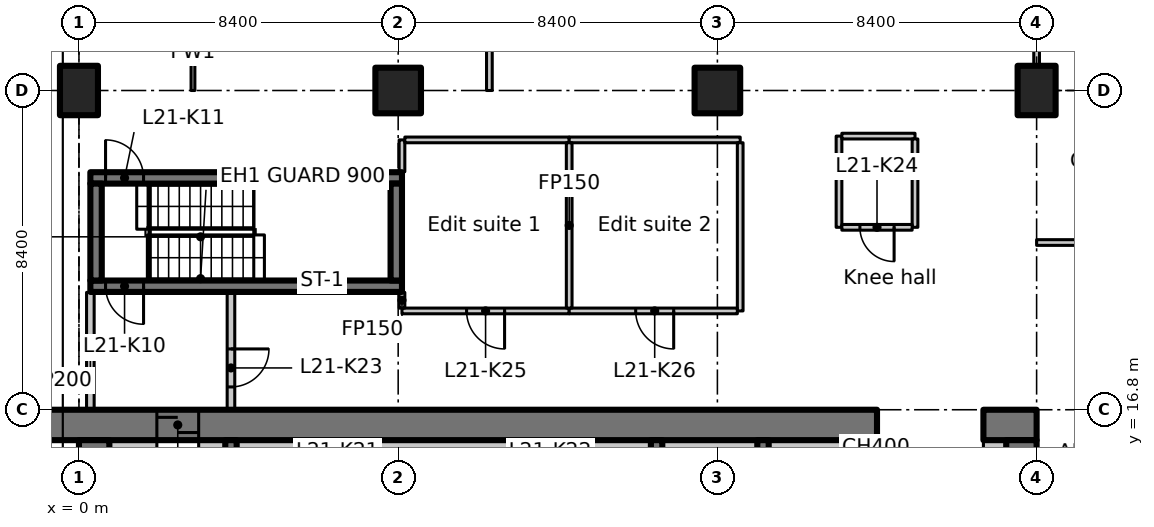
"""IFC4 building model, lengths in metres.
Left out: names, types, materials, properties, quantities, classifications, styles, units other than length and angle.
Written with IfcOpenShell. Run it as: python <this file> out.ifc"""

import sys

from ifc_helpers import new_model, si_unit, direction, frame, frame_2d, origin, origin_2d, place, context, subcontext, project, spatial, polyline, rectangle, outline, extrude, element, fill, save


model = new_model("IFC4")
c1 = context("Model", 3, precision=1e-05, world=origin(), true_north=direction((0.0, 1.0)))
c2 = subcontext(c1, "Body", "Model", "MODEL_VIEW")
j1 = project(units=[si_unit("LENGTHUNIT", "METRE"), si_unit("PLANEANGLEUNIT", "RADIAN")], contexts=[c1])
p1 = place(None, origin())
s1 = spatial("IfcSite", under=j1, at=p1, CompositionType="ELEMENT")
p2 = place(p1, origin())
s2 = spatial("IfcBuilding", under=s1, at=p2, CompositionType="ELEMENT")
p3 = place(p2, frame((0.0, 0.0, 91.7)))
s3 = spatial("IfcBuildingStorey", under=s2, at=p3, CompositionType="ELEMENT", Elevation=91.7)
p4 = place(p3, frame((0.0, 25.2, 0.0), z_axis=(0.0, 0.0, 1.0), x_axis=(1.0, 0.0, 0.0)))
e1 = element("IfcColumn", 1, at=p4, inside=s3, PredefinedType="COLUMN", context=c2, shape_type="SweptSolid", body=[
    extrude(rectangle(XDim=1.0, YDim=1.3, at=origin_2d()), origin(), (0.0, 0.0, 1.0), 3.35),
])
for number, where, z_axis, x_axis in (
    (2, (8.4, 25.2, 0.0), (0.0, 0.0, 1.0), (1.0, 0.0, 0.0)),
    (3, (16.8, 25.2, 0.0), (0.0, 0.0, 1.0), (1.0, 0.0, 0.0)),
):
    element("IfcColumn", number, at=place(p3, frame(where, z_axis=z_axis, x_axis=x_axis)), inside=s3, PredefinedType="COLUMN", context=c2, shape_type="SweptSolid", body=[
        extrude(rectangle(XDim=1.2, YDim=1.2, at=origin_2d()), origin(), (0.0, 0.0, 1.0), 3.35),
    ])
p5 = place(p3, frame((25.2, 25.2, 0.0), z_axis=(0.0, 0.0, 1.0), x_axis=(1.0, 0.0, 0.0)))
e4 = element("IfcColumn", 4, at=p5, inside=s3, PredefinedType="COLUMN", context=c2, shape_type="SweptSolid", body=[
    extrude(rectangle(XDim=1.0, YDim=1.3, at=origin_2d()), origin(), (0.0, 0.0, 1.0), 3.35),
])
p6 = place(p3, frame((-1.1, 16.4, 0.0), z_axis=(0.0, 0.0, 1.0), x_axis=(1.0, 0.0, 0.0)))
e5 = element("IfcWall", 5, at=p6, inside=s3, PredefinedType="SHEAR", context=c2, shape_type="SweptSolid", body=[
    extrude(rectangle(XDim=22.1, YDim=0.8, at=frame_2d((11.05, 0.0))), origin(), (0.0, 0.0, 1.0), 3.35),
])
p7 = place(p6, frame((3.15, 0.0, 0.0)))
e6 = element("IfcOpeningElement", 6, at=p7, cuts=e5, PredefinedType="OPENING", context=c2, shape_type="SweptSolid", body=[
    extrude(rectangle(XDim=1.1, YDim=2.3, at=frame_2d((0.55, 1.15))), frame((0.0, 0.41, 0.0), z_axis=(0.0, -1.0, 0.0), x_axis=(1.0, 0.0, 0.0)), (0.0, 0.0, 1.0), 0.82),
])
p8 = place(p3, frame((23.8, 16.4, 0.0), z_axis=(0.0, 0.0, 1.0), x_axis=(1.0, 0.0, 0.0)))
e7 = element("IfcWall", 7, at=p8, inside=s3, PredefinedType="SHEAR", context=c2, shape_type="SweptSolid", body=[
    extrude(rectangle(XDim=1.4, YDim=0.8, at=frame_2d((0.7, 0.0))), origin(), (0.0, 0.0, 1.0), 3.35),
])
p9 = place(p3, frame((0.4, 7.136, 0.0), z_axis=(0.0, 0.0, 1.0), x_axis=(0.0, 1.0, 0.0)))
e8 = element("IfcWall", 8, at=p9, inside=s3, PredefinedType="SHEAR", context=c2, shape_type="SweptSolid", body=[
    extrude(rectangle(XDim=8.864, YDim=0.8, at=frame_2d((4.432, 0.0))), origin(), (0.0, 0.0, 1.0), 3.35),
])
p10 = place(p3, frame((24.8, 12.6, 0.0), z_axis=(0.0, 0.0, 1.0), x_axis=(0.0, 1.0, 0.0)))
e9 = element("IfcWall", 9, at=p10, inside=s3, PredefinedType="SHEAR", context=c2, shape_type="SweptSolid", body=[
    extrude(rectangle(XDim=3.4, YDim=0.8, at=frame_2d((1.7, 0.0))), origin(), (0.0, 0.0, 1.0), 3.35),
])
p11 = place(p3, frame((0.8, 15.8, 0.0), z_axis=(0.0, 0.0, 1.0), x_axis=(1.0, 0.0, 0.0)))
e10 = element("IfcWall", 10, at=p11, inside=s3, PredefinedType="PARTITIONING", context=c2, shape_type="SweptSolid", body=[
    extrude(rectangle(XDim=1.25, YDim=0.4, at=frame_2d((0.625, 0.0))), origin(), (0.0, 0.0, 1.0), 3.35),
])
p12 = place(p3, frame((23.8, 15.8, 0.0), z_axis=(0.0, 0.0, 1.0), x_axis=(1.0, 0.0, 0.0)))
e11 = element("IfcWall", 11, at=p12, inside=s3, PredefinedType="PARTITIONING", context=c2, shape_type="SweptSolid", body=[
    extrude(rectangle(XDim=0.6, YDim=0.4, at=frame_2d((0.3, 0.0))), origin(), (0.0, 0.0, 1.0), 3.35),
])
for number, where, z_axis, x_axis in (
    (12, (4.0, 12.95, 0.0), (0.0, 0.0, 1.0), (0.0, 1.0, 0.0)),
    (13, (15.2, 12.95, 0.0), (0.0, 0.0, 1.0), (0.0, 1.0, 0.0)),
    (14, (18.0, 12.95, 0.0), (0.0, 0.0, 1.0), (0.0, 1.0, 0.0)),
    (15, (20.8, 12.95, 0.0), (0.0, 0.0, 1.0), (0.0, 1.0, 0.0)),
):
    element("IfcWall", number, at=place(p3, frame(where, z_axis=z_axis, x_axis=x_axis)), inside=s3, PredefinedType="SHEAR", context=c2, shape_type="SweptSolid", body=[
        extrude(rectangle(XDim=3.05, YDim=0.3, at=frame_2d((1.525, 0.0))), origin(), (0.0, 0.0, 1.0), 3.35),
    ])
p13 = place(p3, frame((8.5, 20.05, 0.0), z_axis=(0.0, 0.0, 1.0), x_axis=(-1.0, 0.0, 0.0)))
e16 = element("IfcWall", 16, at=p13, inside=s3, PredefinedType="SHEAR", context=c2, shape_type="SweptSolid", body=[
    extrude(rectangle(XDim=8.2, YDim=0.3, at=frame_2d((4.1, 0.0))), origin(), (0.0, 0.0, 1.0), 3.35),
])
p14 = place(p13, frame((6.8, 0.0, 0.0)))
e17 = element("IfcOpeningElement", 17, at=p14, cuts=e16, PredefinedType="OPENING", context=c2, shape_type="SweptSolid", body=[
    extrude(rectangle(XDim=1.0, YDim=2.1, at=frame_2d((0.5, 1.05))), frame((0.0, 0.16, 0.0), z_axis=(0.0, -1.0, 0.0), x_axis=(1.0, 0.0, 0.0)), (0.0, 0.0, 1.0), 0.32),
])
p15 = place(p3, frame((0.3, 22.9, 0.0), z_axis=(0.0, 0.0, 1.0), x_axis=(1.0, 0.0, 0.0)))
e18 = element("IfcWall", 18, at=p15, inside=s3, PredefinedType="SHEAR", context=c2, shape_type="SweptSolid", body=[
    extrude(rectangle(XDim=8.2, YDim=0.3, at=frame_2d((4.1, 0.0))), origin(), (0.0, 0.0, 1.0), 3.35),
])
p16 = place(p15, frame((0.4, 0.0, 0.0)))
e19 = element("IfcOpeningElement", 19, at=p16, cuts=e18, PredefinedType="OPENING", context=c2, shape_type="SweptSolid", body=[
    extrude(rectangle(XDim=1.0, YDim=2.1, at=frame_2d((0.5, 1.05))), frame((0.0, 0.16, 0.0), z_axis=(0.0, -1.0, 0.0), x_axis=(1.0, 0.0, 0.0)), (0.0, 0.0, 1.0), 0.32),
])
for number, where, z_axis, x_axis in (
    (20, (0.45, 20.2, 0.0), (0.0, 0.0, 1.0), (0.0, 1.0, 0.0)),
    (21, (8.35, 20.2, 0.0), (0.0, 0.0, 1.0), (0.0, 1.0, 0.0)),
):
    element("IfcWall", number, at=place(p3, frame(where, z_axis=z_axis, x_axis=x_axis)), inside=s3, PredefinedType="SHEAR", context=c2, shape_type="SweptSolid", body=[
        extrude(rectangle(XDim=2.55, YDim=0.3, at=frame_2d((1.275, 0.0))), origin(), (0.0, 0.0, 1.0), 3.35),
    ])
p17 = place(p3, frame((0.3, 16.812, 0.0), z_axis=(0.0, 0.0, 1.0), x_axis=(0.0, 1.0, 0.0)))
e22 = element("IfcWall", 22, at=p17, inside=s3, PredefinedType="PARTITIONING", context=c2, shape_type="SweptSolid", body=[
    extrude(rectangle(XDim=3.076, YDim=0.2, at=frame_2d((1.538, 0.0))), origin(), (0.0, 0.0, 1.0), 2.98),
])
p18 = place(p3, frame((4.0, 19.888, 0.0), z_axis=(0.0, 0.0, 1.0), x_axis=(0.0, -1.0, 0.0)))
e23 = element("IfcWall", 23, at=p18, inside=s3, PredefinedType="PARTITIONING", context=c2, shape_type="SweptSolid", body=[
    extrude(rectangle(XDim=3.076, YDim=0.2, at=frame_2d((1.538, 0.0))), origin(), (0.0, 0.0, 1.0), 3.35),
])
p19 = place(p18, frame((1.488, 0.0, 0.0)))
e24 = element("IfcOpeningElement", 24, at=p19, cuts=e23, PredefinedType="OPENING", context=c2, shape_type="SweptSolid", body=[
    extrude(rectangle(XDim=1.0, YDim=2.1, at=frame_2d((0.5, 1.05))), frame((0.0, 0.11, 0.0), z_axis=(0.0, -1.0, 0.0), x_axis=(1.0, 0.0, 0.0)), (0.0, 0.0, 1.0), 0.22),
])
p20 = place(p3, frame((12.9, 19.4, 0.0), z_axis=(0.0, 0.0, 1.0), x_axis=(-1.0, 0.0, 0.0)))
e25 = element("IfcWall", 25, at=p20, inside=s3, PredefinedType="PARTITIONING", context=c2, shape_type="SweptSolid", body=[
    extrude(rectangle(XDim=4.4, YDim=0.15, at=frame_2d((2.2, 0.0))), origin(), (0.0, 0.0, 1.0), 3.35),
])
p21 = place(p20, frame((1.7, 0.0, 0.0)))
e26 = element("IfcOpeningElement", 26, at=p21, cuts=e25, PredefinedType="OPENING", context=c2, shape_type="SweptSolid", body=[
    extrude(rectangle(XDim=1.0, YDim=2.1, at=frame_2d((0.5, 1.05))), frame((0.0, 0.085, 0.0), z_axis=(0.0, -1.0, 0.0), x_axis=(1.0, 0.0, 0.0)), (0.0, 0.0, 1.0), 0.17),
])
p22 = place(p3, frame((8.5, 19.475, 0.0), z_axis=(0.0, 0.0, 1.0), x_axis=(0.0, 1.0, 0.0)))
e27 = element("IfcWall", 27, at=p22, inside=s3, PredefinedType="PARTITIONING", context=c2, shape_type="SweptSolid", body=[
    extrude(rectangle(XDim=0.413, YDim=0.15, at=frame_2d((0.207, 0.0))), origin(), (0.0, 0.0, 1.0), 3.35),
])
p23 = place(p3, frame((8.5, 23.062, 0.0), z_axis=(0.0, 0.0, 1.0), x_axis=(0.0, 1.0, 0.0)))
e28 = element("IfcWall", 28, at=p23, inside=s3, PredefinedType="PARTITIONING", context=c2, shape_type="SweptSolid", body=[
    extrude(rectangle(XDim=0.838, YDim=0.15, at=frame_2d((0.419, 0.0))), origin(), (0.0, 0.0, 1.0), 3.35),
])
p24 = place(p3, frame((8.575, 23.9, 0.0), z_axis=(0.0, 0.0, 1.0), x_axis=(1.0, 0.0, 0.0)))
e29 = element("IfcWall", 29, at=p24, inside=s3, PredefinedType="PARTITIONING", context=c2, shape_type="SweptSolid", body=[
    extrude(rectangle(XDim=4.325, YDim=0.15, at=frame_2d((2.163, 0.0))), origin(), (0.0, 0.0, 1.0), 3.35),
])
p25 = place(p3, frame((12.9, 23.9, 0.0), z_axis=(0.0, 0.0, 1.0), x_axis=(1.0, 0.0, 0.0)))
e30 = element("IfcWall", 30, at=p25, inside=s3, PredefinedType="PARTITIONING", context=c2, shape_type="SweptSolid", body=[
    extrude(rectangle(XDim=4.5, YDim=0.15, at=frame_2d((2.25, 0.0))), origin(), (0.0, 0.0, 1.0), 3.35),
])
p26 = place(p3, frame((17.4, 23.825, 0.0), z_axis=(0.0, 0.0, 1.0), x_axis=(0.0, -1.0, 0.0)))
e31 = element("IfcWall", 31, at=p26, inside=s3, PredefinedType="PARTITIONING", context=c2, shape_type="SweptSolid", body=[
    extrude(rectangle(XDim=4.425, YDim=0.15, at=frame_2d((2.212, 0.0))), origin(), (0.0, 0.0, 1.0), 3.35),
])
p27 = place(p3, frame((17.325, 19.4, 0.0), z_axis=(0.0, 0.0, 1.0), x_axis=(-1.0, 0.0, 0.0)))
e32 = element("IfcWall", 32, at=p27, inside=s3, PredefinedType="PARTITIONING", context=c2, shape_type="SweptSolid", body=[
    extrude(rectangle(XDim=4.425, YDim=0.15, at=frame_2d((2.212, 0.0))), origin(), (0.0, 0.0, 1.0), 3.35),
])
p28 = place(p27, frame((1.675, 0.0, 0.0)))
e33 = element("IfcOpeningElement", 33, at=p28, cuts=e32, PredefinedType="OPENING", context=c2, shape_type="SweptSolid", body=[
    extrude(rectangle(XDim=1.0, YDim=2.1, at=frame_2d((0.5, 1.05))), frame((0.0, 0.085, 0.0), z_axis=(0.0, -1.0, 0.0), x_axis=(1.0, 0.0, 0.0)), (0.0, 0.0, 1.0), 0.17),
])
p29 = place(p3, frame((12.9, 23.825, 0.0), z_axis=(0.0, 0.0, 1.0), x_axis=(0.0, -1.0, 0.0)))
e34 = element("IfcWall", 34, at=p29, inside=s3, PredefinedType="PARTITIONING", context=c2, shape_type="SweptSolid", body=[
    extrude(rectangle(XDim=4.35, YDim=0.15, at=frame_2d((2.175, 0.0))), origin(), (0.0, 0.0, 1.0), 3.35),
])
p30 = place(p3, frame((20.0, 21.6, 0.0), z_axis=(0.0, 0.0, 1.0), x_axis=(0.0, 1.0, 0.0)))
e35 = element("IfcWall", 35, at=p30, inside=s3, PredefinedType="PARTITIONING", context=c2, shape_type="SweptSolid", body=[
    extrude(rectangle(XDim=2.4, YDim=0.15, at=frame_2d((1.2, 0.0))), origin(), (0.0, 0.0, 1.0), 3.35),
])
p31 = place(p3, frame((20.075, 24.0, 0.0), z_axis=(0.0, 0.0, 1.0), x_axis=(1.0, 0.0, 0.0)))
e36 = element("IfcWall", 36, at=p31, inside=s3, PredefinedType="PARTITIONING", context=c2, shape_type="SweptSolid", body=[
    extrude(rectangle(XDim=1.925, YDim=0.15, at=frame_2d((0.962, 0.0))), origin(), (0.0, 0.0, 1.0), 3.35),
])
p32 = place(p3, frame((22.0, 23.925, 0.0), z_axis=(0.0, 0.0, 1.0), x_axis=(0.0, -1.0, 0.0)))
e37 = element("IfcWall", 37, at=p32, inside=s3, PredefinedType="PARTITIONING", context=c2, shape_type="SweptSolid", body=[
    extrude(rectangle(XDim=2.325, YDim=0.15, at=frame_2d((1.163, 0.0))), origin(), (0.0, 0.0, 1.0), 3.35),
])
p33 = place(p3, frame((21.925, 21.6, 0.0), z_axis=(0.0, 0.0, 1.0), x_axis=(-1.0, 0.0, 0.0)))
e38 = element("IfcWall", 38, at=p33, inside=s3, PredefinedType="PARTITIONING", context=c2, shape_type="SweptSolid", body=[
    extrude(rectangle(XDim=1.85, YDim=0.15, at=frame_2d((0.925, 0.0))), origin(), (0.0, 0.0, 1.0), 3.35),
])
p34 = place(p33, frame((0.475, 0.0, 0.0)))
e39 = element("IfcOpeningElement", 39, at=p34, cuts=e38, PredefinedType="OPENING", context=c2, shape_type="SweptSolid", body=[
    extrude(rectangle(XDim=0.9, YDim=2.1, at=frame_2d((0.45, 1.05))), frame((0.0, 0.085, 0.0), z_axis=(0.0, -1.0, 0.0), x_axis=(1.0, 0.0, 0.0)), (0.0, 0.0, 1.0), 0.17),
])
p35 = place(p3, frame((3.15, 15.8, 0.0), z_axis=(0.0, 0.0, 1.0), x_axis=(1.0, 0.0, 0.0)))
e40 = element("IfcWall", 40, at=p35, inside=s3, PredefinedType="PARTITIONING", context=c2, shape_type="SweptSolid", body=[
    extrude(rectangle(XDim=0.7, YDim=0.4, at=frame_2d((0.35, 0.0))), origin(), (0.0, 0.0, 1.0), 3.35),
])
p36 = place(p3, frame((4.15, 15.8, 0.0), z_axis=(0.0, 0.0, 1.0), x_axis=(1.0, 0.0, 0.0)))
e41 = element("IfcWall", 41, at=p36, inside=s3, PredefinedType="PARTITIONING", context=c2, shape_type="SweptSolid", body=[
    extrude(rectangle(XDim=10.9, YDim=0.4, at=frame_2d((5.45, 0.0))), origin(), (0.0, 0.0, 1.0), 3.35),
])
for number, where, z_axis, x_axis in (
    (42, (15.35, 15.8, 0.0), (0.0, 0.0, 1.0), (1.0, 0.0, 0.0)),
    (43, (18.15, 15.8, 0.0), (0.0, 0.0, 1.0), (1.0, 0.0, 0.0)),
):
    element("IfcWall", number, at=place(p3, frame(where, z_axis=z_axis, x_axis=x_axis)), inside=s3, PredefinedType="PARTITIONING", context=c2, shape_type="SweptSolid", body=[
        extrude(rectangle(XDim=2.5, YDim=0.4, at=frame_2d((1.25, 0.0))), origin(), (0.0, 0.0, 1.0), 3.35),
    ])
p37 = place(p3, frame((20.95, 15.8, 0.0), z_axis=(0.0, 0.0, 1.0), x_axis=(1.0, 0.0, 0.0)))
e44 = element("IfcWall", 44, at=p37, inside=s3, PredefinedType="PARTITIONING", context=c2, shape_type="SweptSolid", body=[
    extrude(rectangle(XDim=0.05, YDim=0.4, at=frame_2d((0.025, 0.0))), origin(), (0.0, 0.0, 1.0), 3.35),
])
p38 = place(p3, frame((25.2, 21.2, 0.0), z_axis=(0.0, 0.0, 1.0), x_axis=(1.0, 0.0, 0.0)))
e45 = element("IfcWall", 45, at=p38, inside=s3, PredefinedType="PARTITIONING", context=c2, shape_type="SweptSolid", body=[
    extrude(rectangle(XDim=4.2, YDim=0.15, at=frame_2d((2.1, 0.0))), origin(), (0.0, 0.0, 1.0), 3.33),
])
p39 = place(p3, frame((25.2, 31.0, 0.0), z_axis=(0.0, 0.0, 1.0), x_axis=(0.0, -1.0, 0.0)))
e46 = element("IfcWall", 46, at=p39, inside=s3, PredefinedType="PARTITIONING", context=c2, shape_type="SweptSolid", body=[
    extrude(outline(polyline([(0.0, 0.0), (5.13, 0.0), (5.13, 2.98), (0.0, 2.98), (0.0, 0.0)])), frame((0.0, 0.075, 0.0), z_axis=(0.0, -1.0, 0.0), x_axis=(1.0, 0.0, 0.0)), (0.0, 0.0, 1.0), 0.15),
])
p40 = place(p39, frame((1.93, 0.0, 0.0)))
e47 = element("IfcOpeningElement", 47, at=p40, cuts=e46, PredefinedType="OPENING", context=c2, shape_type="SweptSolid", body=[
    extrude(rectangle(XDim=1.1, YDim=2.1, at=frame_2d((0.55, 1.05))), frame((0.0, 0.085, 0.0), z_axis=(0.0, -1.0, 0.0), x_axis=(1.0, 0.0, 0.0)), (0.0, 0.0, 1.0), 0.17),
])
p41 = place(p3, frame((10.8, 25.2, 0.0), z_axis=(0.0, 0.0, 1.0), x_axis=(0.0, 1.0, 0.0)))
e48 = element("IfcWall", 48, at=p41, inside=s3, PredefinedType="PARTITIONING", context=c2, shape_type="SweptSolid", body=[
    extrude(rectangle(XDim=4.2, YDim=0.15, at=frame_2d((2.1, 0.0))), origin(), (0.0, 0.0, 1.0), 3.33),
])
p42 = place(p3, frame((3.0, 29.4, 0.0), z_axis=(0.0, 0.0, 1.0), x_axis=(0.0, -1.0, 0.0)))
e49 = element("IfcWall", 49, at=p42, inside=s3, PredefinedType="PARTITIONING", context=c2, shape_type="SweptSolid", body=[
    extrude(rectangle(XDim=4.2, YDim=0.1, at=frame_2d((2.1, 0.0))), origin(), (0.0, 0.0, 1.0), 3.33),
])
p43 = place(p7, origin())
e50 = element("IfcDoor", 50, at=p43, inside=s3, OperationType="SLIDING_TO_LEFT", PredefinedType="DOOR", context=c2, shape_type="SweptSolid", body=[
    extrude(rectangle(XDim=1.1, YDim=2.3, at=frame_2d((0.55, 1.15))), frame((0.0, 0.025, 0.0), z_axis=(0.0, -1.0, 0.0), x_axis=(1.0, 0.0, 0.0)), (0.0, 0.0, 1.0), 0.05),
])
fill(e6, e50)
p44 = place(p14, origin())
e51 = element("IfcDoor", 51, at=p44, inside=s3, OperationType="SINGLE_SWING_RIGHT", PredefinedType="DOOR", context=c2, shape_type="SweptSolid", body=[
    extrude(rectangle(XDim=1.0, YDim=2.1, at=frame_2d((0.5, 1.05))), frame((0.0, 0.025, 0.0), z_axis=(0.0, -1.0, 0.0), x_axis=(1.0, 0.0, 0.0)), (0.0, 0.0, 1.0), 0.05),
])
fill(e17, e51)
p45 = place(p16, origin())
e52 = element("IfcDoor", 52, at=p45, inside=s3, OperationType="SINGLE_SWING_LEFT", PredefinedType="DOOR", context=c2, shape_type="SweptSolid", body=[
    extrude(rectangle(XDim=1.0, YDim=2.1, at=frame_2d((0.5, 1.05))), frame((0.0, 0.025, 0.0), z_axis=(0.0, -1.0, 0.0), x_axis=(1.0, 0.0, 0.0)), (0.0, 0.0, 1.0), 0.05),
])
fill(e19, e52)
p46 = place(p19, origin())
e53 = element("IfcDoor", 53, at=p46, inside=s3, OperationType="SINGLE_SWING_LEFT", PredefinedType="DOOR", context=c2, shape_type="SweptSolid", body=[
    extrude(rectangle(XDim=1.0, YDim=2.1, at=frame_2d((0.5, 1.05))), frame((0.0, 0.025, 0.0), z_axis=(0.0, -1.0, 0.0), x_axis=(1.0, 0.0, 0.0)), (0.0, 0.0, 1.0), 0.05),
])
fill(e24, e53)
p47 = place(p34, origin())
e54 = element("IfcDoor", 54, at=p47, inside=s3, OperationType="SINGLE_SWING_RIGHT", PredefinedType="DOOR", context=c2, shape_type="SweptSolid", body=[
    extrude(rectangle(XDim=0.9, YDim=2.1, at=frame_2d((0.45, 1.05))), frame((0.0, 0.025, 0.0), z_axis=(0.0, -1.0, 0.0), x_axis=(1.0, 0.0, 0.0)), (0.0, 0.0, 1.0), 0.05),
])
fill(e39, e54)
p48 = place(p21, origin())
e55 = element("IfcDoor", 55, at=p48, inside=s3, OperationType="SINGLE_SWING_LEFT", PredefinedType="DOOR", context=c2, shape_type="SweptSolid", body=[
    extrude(rectangle(XDim=1.0, YDim=2.1, at=frame_2d((0.5, 1.05))), frame((0.0, 0.025, 0.0), z_axis=(0.0, -1.0, 0.0), x_axis=(1.0, 0.0, 0.0)), (0.0, 0.0, 1.0), 0.05),
])
fill(e26, e55)
p49 = place(p28, origin())
e56 = element("IfcDoor", 56, at=p49, inside=s3, OperationType="SINGLE_SWING_RIGHT", PredefinedType="DOOR", context=c2, shape_type="SweptSolid", body=[
    extrude(rectangle(XDim=1.0, YDim=2.1, at=frame_2d((0.5, 1.05))), frame((0.0, 0.025, 0.0), z_axis=(0.0, -1.0, 0.0), x_axis=(1.0, 0.0, 0.0)), (0.0, 0.0, 1.0), 0.05),
])
fill(e33, e56)
save(model, sys.argv[1])
